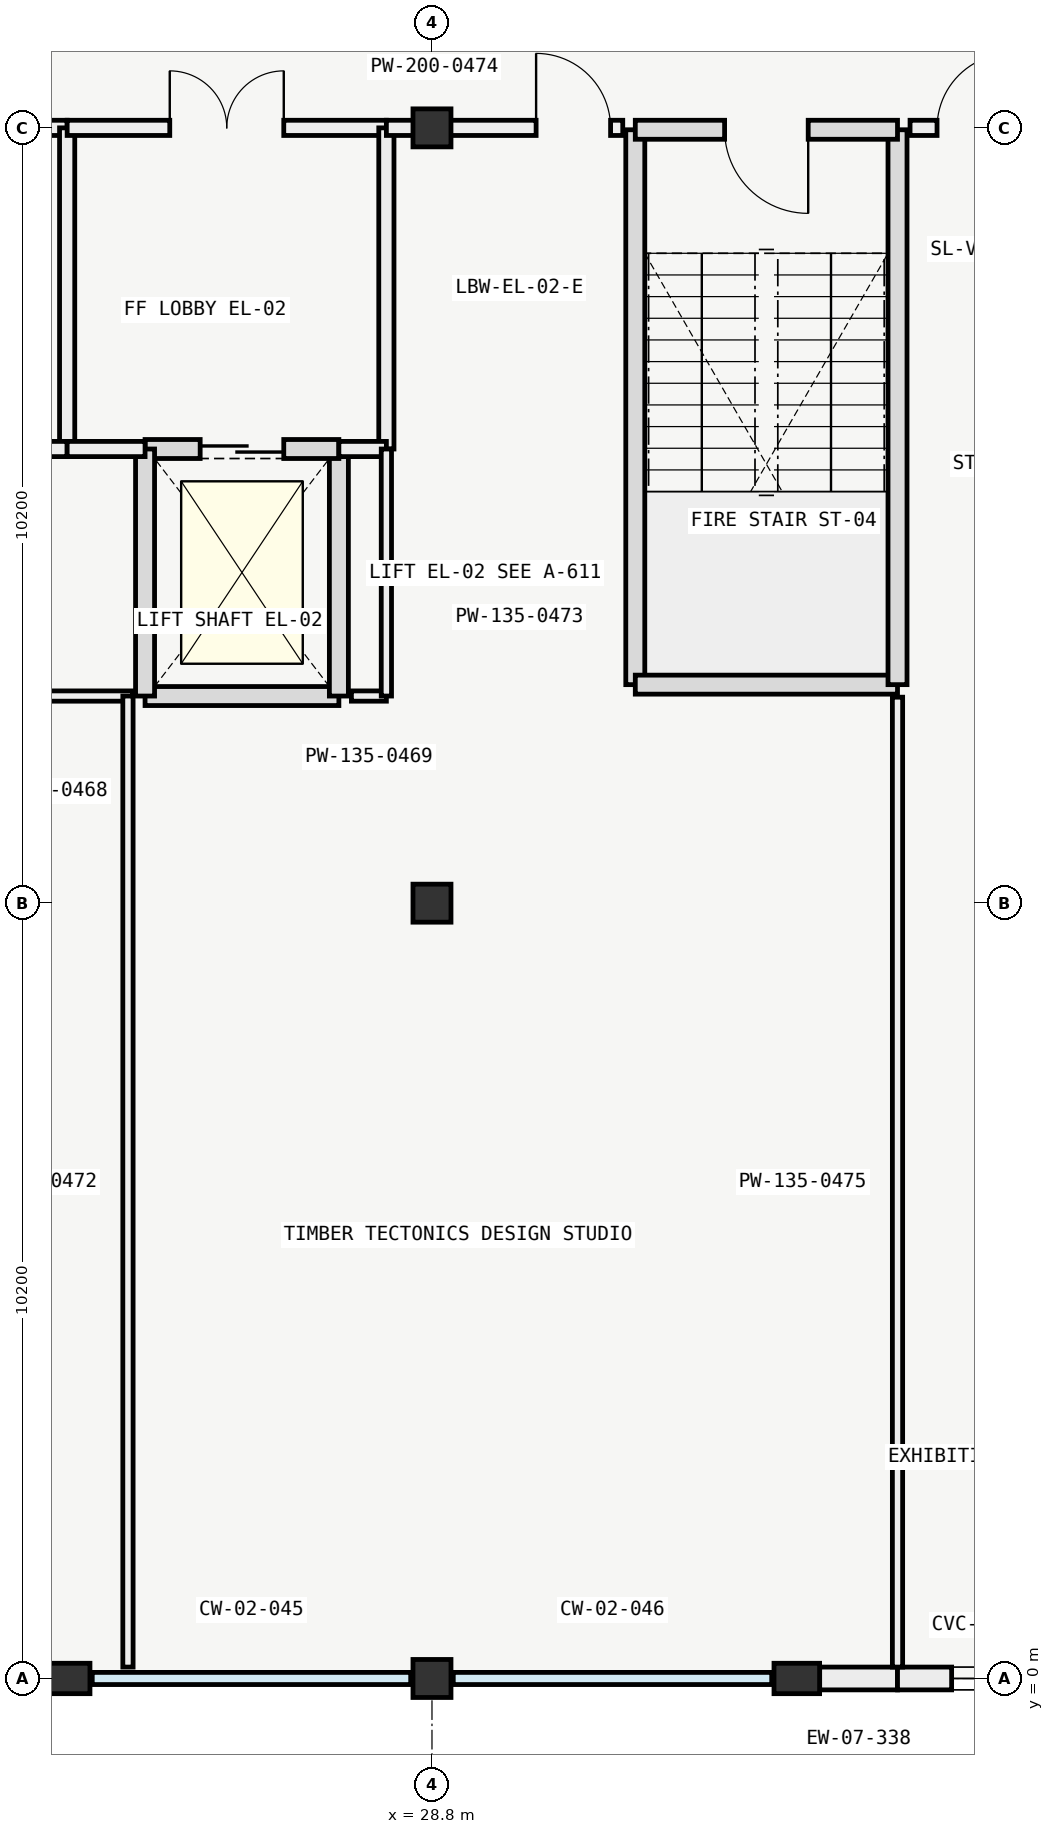
"""IFC4 building model, lengths in metres.
Left out: names, types, materials, properties, quantities, classifications, styles, units other than length and angle.
Written with IfcOpenShell. Run it as: python <this file> out.ifc"""

import sys

from ifc_helpers import new_model, si_unit, direction, frame, frame_2d, origin, origin_2d, place, context, subcontext, project, spatial, rectangle, extrude, element, fill, save


model = new_model("IFC4")
c1 = context("Model", 3, precision=1e-05, world=origin(), true_north=direction((0.0, 1.0)))
c2 = subcontext(c1, "Body", "Model", "MODEL_VIEW")
j1 = project(units=[si_unit("LENGTHUNIT", "METRE"), si_unit("PLANEANGLEUNIT", "RADIAN")], contexts=[c1])
p1 = place(None, origin())
s1 = spatial("IfcSite", under=j1, at=p1, CompositionType="ELEMENT")
p2 = place(p1, origin())
s2 = spatial("IfcBuilding", under=s1, at=p2, CompositionType="ELEMENT")
p3 = place(p2, frame((0.0, 0.0, 26.4)))
s3 = spatial("IfcBuildingStorey", under=s2, at=p3, CompositionType="ELEMENT", Elevation=26.4)
for number, where, z_axis, x_axis in (
    (1, (28.8, 0.0, 0.0), (0.0, 0.0, 1.0), (1.0, 0.0, 0.0)),
    (2, (28.8, 10.2, 0.0), (0.0, 0.0, 1.0), (1.0, 0.0, 0.0)),
    (3, (28.8, 20.4, 0.0), (0.0, 0.0, 1.0), (1.0, 0.0, 0.0)),
):
    element("IfcColumn", number, at=place(p3, frame(where, z_axis=z_axis, x_axis=x_axis)), inside=s3, PredefinedType="COLUMN", context=c2, shape_type="SweptSolid", body=[
        extrude(rectangle(XDim=0.5, YDim=0.5, at=origin_2d()), origin(), (0.0, 0.0, 1.0), 4.2),
    ])
for number, where, z_axis, x_axis in (
    (4, (24.0, 0.0, 0.0), (0.0, 0.0, 1.0), (0.0, 1.0, 0.0)),
    (5, (33.6, 0.0, 0.0), (0.0, 0.0, 1.0), (0.0, 1.0, 0.0)),
):
    element("IfcColumn", number, at=place(p3, frame(where, z_axis=z_axis, x_axis=x_axis)), inside=s3, PredefinedType="PILASTER", context=c2, shape_type="SweptSolid", body=[
        extrude(rectangle(XDim=0.4, YDim=0.6, at=origin_2d()), origin(), (0.0, 0.0, 1.0), 4.2),
    ])
p4 = place(p3, frame((34.925, 0.0, 0.0), z_axis=(0.0, 0.0, 1.0), x_axis=(-1.0, 0.0, 0.0)))
e6 = element("IfcWall", 6, at=p4, inside=s3, PredefinedType="SOLIDWALL", context=c2, shape_type="SweptSolid", body=[
    extrude(rectangle(XDim=1.024, YDim=0.3, at=frame_2d((0.512, 0.0))), origin(), (0.0, 0.0, 1.0), 3.25),
])
p5 = place(p3, frame((38.149, 0.0, 0.0), z_axis=(0.0, 0.0, 1.0), x_axis=(-1.0, 0.0, 0.0)))
e7 = element("IfcWall", 7, at=p5, inside=s3, PredefinedType="SOLIDWALL", context=c2, shape_type="SweptSolid", body=[
    extrude(rectangle(XDim=3.224, YDim=0.3, at=frame_2d((1.612, 0.0))), origin(), (0.0, 0.0, 1.0), 3.25),
])
p6 = place(p5, frame((0.712, 0.0, 0.8)))
e8 = element("IfcOpeningElement", 8, at=p6, cuts=e7, PredefinedType="OPENING", context=c2, shape_type="SweptSolid", body=[
    extrude(rectangle(XDim=1.8, YDim=2.1, at=frame_2d((0.9, 1.05))), frame((0.0, 0.16, 0.0), z_axis=(0.0, -1.0, 0.0), x_axis=(1.0, 0.0, 0.0)), (0.0, 0.0, 1.0), 0.32),
])
p7 = place(p3, frame((31.475, 20.375, 0.0), z_axis=(0.0, 0.0, 1.0), x_axis=(0.0, -1.0, 0.0)))
e9 = element("IfcWall", 9, at=p7, inside=s3, PredefinedType="SOLIDWALL", context=c2, shape_type="SweptSolid", body=[
    extrude(rectangle(XDim=7.3, YDim=0.25, at=frame_2d((3.65, 0.0))), origin(), (0.0, 0.0, 1.0), 3.975),
])
p8 = place(p3, frame((31.475, 13.075, 0.0), z_axis=(0.0, 0.0, 1.0), x_axis=(1.0, 0.0, 0.0)))
e10 = element("IfcWall", 10, at=p8, inside=s3, PredefinedType="SOLIDWALL", context=c2, shape_type="SweptSolid", body=[
    extrude(rectangle(XDim=3.45, YDim=0.25, at=frame_2d((1.725, 0.0))), origin(), (0.0, 0.0, 1.0), 3.975),
])
p9 = place(p3, frame((34.925, 13.075, 0.0), z_axis=(0.0, 0.0, 1.0), x_axis=(0.0, 1.0, 0.0)))
e11 = element("IfcWall", 11, at=p9, inside=s3, PredefinedType="SOLIDWALL", context=c2, shape_type="SweptSolid", body=[
    extrude(rectangle(XDim=7.3, YDim=0.25, at=frame_2d((3.65, 0.0))), origin(), (0.0, 0.0, 1.0), 3.975),
])
p10 = place(p3, frame((34.925, 20.375, 0.0), z_axis=(0.0, 0.0, 1.0), x_axis=(-1.0, 0.0, 0.0)))
e12 = element("IfcWall", 12, at=p10, inside=s3, PredefinedType="SOLIDWALL", context=c2, shape_type="SweptSolid", body=[
    extrude(rectangle(XDim=3.45, YDim=0.25, at=frame_2d((1.725, 0.0))), origin(), (0.0, 0.0, 1.0), 3.975),
])
p11 = place(p10, frame((1.175, 0.0, 0.0)))
e13 = element("IfcOpeningElement", 13, at=p11, cuts=e12, PredefinedType="OPENING", context=c2, shape_type="SweptSolid", body=[
    extrude(rectangle(XDim=1.1, YDim=2.2, at=frame_2d((0.55, 1.1))), frame((0.0, 0.135, 0.0), z_axis=(0.0, -1.0, 0.0), x_axis=(1.0, 0.0, 0.0)), (0.0, 0.0, 1.0), 0.27),
])
p12 = place(p3, frame((19.8, 20.4, 0.0), z_axis=(0.0, 0.0, 1.0), x_axis=(1.0, 0.0, 0.0)))
e14 = element("IfcWall", 14, at=p12, inside=s3, PredefinedType="PARTITIONING", context=c2, shape_type="SweptSolid", body=[
    extrude(rectangle(XDim=4.2, YDim=0.2, at=frame_2d((2.1, 0.0))), origin(), (0.0, 0.0, 1.0), 3.405),
])
p13 = place(p12, frame((1.35, 0.0, 0.0)))
e15 = element("IfcOpeningElement", 15, at=p13, cuts=e14, PredefinedType="OPENING", context=c2, shape_type="SweptSolid", body=[
    extrude(rectangle(XDim=1.5, YDim=2.2, at=frame_2d((0.75, 1.1))), frame((0.0, 0.11, 0.0), z_axis=(0.0, -1.0, 0.0), x_axis=(1.0, 0.0, 0.0)), (0.0, 0.0, 1.0), 0.22),
])
p14 = place(p3, frame((24.0, 16.175, 0.0), z_axis=(0.0, 0.0, 1.0), x_axis=(0.0, 1.0, 0.0)))
e16 = element("IfcWall", 16, at=p14, inside=s3, PredefinedType="PARTITIONING", context=c2, shape_type="SweptSolid", body=[
    extrude(rectangle(XDim=4.225, YDim=0.2, at=frame_2d((2.112, 0.0))), origin(), (0.0, 0.0, 1.0), 3.405),
])
p15 = place(p3, frame((22.975, 16.175, 0.0), z_axis=(0.0, 0.0, 1.0), x_axis=(1.0, 0.0, 0.0)))
e17 = element("IfcWall", 17, at=p15, inside=s3, PredefinedType="PARTITIONING", context=c2, shape_type="SweptSolid", body=[
    extrude(rectangle(XDim=1.025, YDim=0.2, at=frame_2d((0.512, 0.0))), origin(), (0.0, 0.0, 1.0), 3.55),
])
p16 = place(p3, frame((25.025, 12.925, 0.0), z_axis=(0.0, 0.0, 1.0), x_axis=(1.0, 0.0, 0.0)))
e18 = element("IfcWall", 18, at=p16, inside=s3, PredefinedType="SOLIDWALL", context=c2, shape_type="SweptSolid", body=[
    extrude(rectangle(XDim=2.55, YDim=0.25, at=frame_2d((1.275, 0.0))), origin(), (0.0, 0.0, 1.0), 3.975),
])
p17 = place(p3, frame((27.575, 12.925, 0.0), z_axis=(0.0, 0.0, 1.0), x_axis=(0.0, 1.0, 0.0)))
e19 = element("IfcWall", 19, at=p17, inside=s3, PredefinedType="SOLIDWALL", context=c2, shape_type="SweptSolid", body=[
    extrude(rectangle(XDim=3.25, YDim=0.25, at=frame_2d((1.625, 0.0))), origin(), (0.0, 0.0, 1.0), 3.975),
])
p18 = place(p3, frame((27.575, 16.175, 0.0), z_axis=(0.0, 0.0, 1.0), x_axis=(-1.0, 0.0, 0.0)))
e20 = element("IfcWall", 20, at=p18, inside=s3, PredefinedType="SOLIDWALL", context=c2, shape_type="SweptSolid", body=[
    extrude(rectangle(XDim=2.55, YDim=0.25, at=frame_2d((1.275, 0.0))), origin(), (0.0, 0.0, 1.0), 3.975),
])
p19 = place(p18, frame((0.725, 0.0, 0.0)))
e21 = element("IfcOpeningElement", 21, at=p19, cuts=e20, PredefinedType="OPENING", context=c2, shape_type="SweptSolid", body=[
    extrude(rectangle(XDim=1.1, YDim=2.1, at=frame_2d((0.55, 1.05))), frame((0.0, 0.135, 0.0), z_axis=(0.0, -1.0, 0.0), x_axis=(1.0, 0.0, 0.0)), (0.0, 0.0, 1.0), 0.27),
])
p20 = place(p3, frame((25.025, 16.175, 0.0), z_axis=(0.0, 0.0, 1.0), x_axis=(0.0, -1.0, 0.0)))
e22 = element("IfcWall", 22, at=p20, inside=s3, PredefinedType="SOLIDWALL", context=c2, shape_type="SweptSolid", body=[
    extrude(rectangle(XDim=3.25, YDim=0.25, at=frame_2d((1.625, 0.0))), origin(), (0.0, 0.0, 1.0), 3.975),
])
p21 = place(p3, frame((24.0, 20.4, 0.0), z_axis=(0.0, 0.0, 1.0), x_axis=(1.0, 0.0, 0.0)))
e23 = element("IfcWall", 23, at=p21, inside=s3, PredefinedType="PARTITIONING", context=c2, shape_type="SweptSolid", body=[
    extrude(rectangle(XDim=4.2, YDim=0.2, at=frame_2d((2.1, 0.0))), origin(), (0.0, 0.0, 1.0), 3.405),
])
p22 = place(p21, frame((1.35, 0.0, 0.0)))
e24 = element("IfcOpeningElement", 24, at=p22, cuts=e23, PredefinedType="OPENING", context=c2, shape_type="SweptSolid", body=[
    extrude(rectangle(XDim=1.5, YDim=2.2, at=frame_2d((0.75, 1.1))), frame((0.0, 0.11, 0.0), z_axis=(0.0, -1.0, 0.0), x_axis=(1.0, 0.0, 0.0)), (0.0, 0.0, 1.0), 0.22),
])
p23 = place(p3, frame((28.2, 16.175, 0.0), z_axis=(0.0, 0.0, 1.0), x_axis=(0.0, 1.0, 0.0)))
e25 = element("IfcWall", 25, at=p23, inside=s3, PredefinedType="PARTITIONING", context=c2, shape_type="SweptSolid", body=[
    extrude(rectangle(XDim=4.225, YDim=0.2, at=frame_2d((2.112, 0.0))), origin(), (0.0, 0.0, 1.0), 3.405),
])
p24 = place(p3, frame((24.0, 16.175, 0.0), z_axis=(0.0, 0.0, 1.0), x_axis=(1.0, 0.0, 0.0)))
e26 = element("IfcWall", 26, at=p24, inside=s3, PredefinedType="PARTITIONING", context=c2, shape_type="SweptSolid", body=[
    extrude(rectangle(XDim=1.025, YDim=0.2, at=frame_2d((0.512, 0.0))), origin(), (0.0, 0.0, 1.0), 3.55),
])
p25 = place(p3, frame((27.575, 16.175, 0.0), z_axis=(0.0, 0.0, 1.0), x_axis=(1.0, 0.0, 0.0)))
e27 = element("IfcWall", 27, at=p25, inside=s3, PredefinedType="PARTITIONING", context=c2, shape_type="SweptSolid", body=[
    extrude(rectangle(XDim=0.625, YDim=0.2, at=frame_2d((0.312, 0.0))), origin(), (0.0, 0.0, 1.0), 3.55),
])
p26 = place(p3, frame((23.14, 12.925, 0.0), z_axis=(0.0, 0.0, 1.0), x_axis=(1.0, 0.0, 0.0)))
e28 = element("IfcWall", 28, at=p26, inside=s3, PredefinedType="PARTITIONING", context=c2, shape_type="SweptSolid", body=[
    extrude(rectangle(XDim=1.72, YDim=0.135, at=frame_2d((0.86, 0.0))), origin(), (0.0, 0.0, 1.0), 3.85),
])
p27 = place(p3, frame((27.74, 12.925, 0.0), z_axis=(0.0, 0.0, 1.0), x_axis=(1.0, 0.0, 0.0)))
e29 = element("IfcWall", 29, at=p27, inside=s3, PredefinedType="PARTITIONING", context=c2, shape_type="SweptSolid", body=[
    extrude(rectangle(XDim=0.46, YDim=0.135, at=frame_2d((0.23, 0.0))), origin(), (0.0, 0.0, 1.0), 3.85),
])
p28 = place(p3, frame((24.8, 0.15, 0.0), z_axis=(0.0, 0.0, 1.0), x_axis=(0.0, 1.0, 0.0)))
e30 = element("IfcWall", 30, at=p28, inside=s3, PredefinedType="PARTITIONING", context=c2, shape_type="SweptSolid", body=[
    extrude(rectangle(XDim=12.775, YDim=0.135, at=frame_2d((6.388, 0.0))), origin(), (0.0, 0.0, 1.0), 3.405),
])
p29 = place(p3, frame((28.2, 12.925, 0.0), z_axis=(0.0, 0.0, 1.0), x_axis=(0.0, 1.0, 0.0)))
e31 = element("IfcWall", 31, at=p29, inside=s3, PredefinedType="PARTITIONING", context=c2, shape_type="SweptSolid", body=[
    extrude(rectangle(XDim=3.25, YDim=0.135, at=frame_2d((1.625, 0.0))), origin(), (0.0, 0.0, 1.0), 3.85),
])
p30 = place(p3, frame((28.2, 20.4, 0.0), z_axis=(0.0, 0.0, 1.0), x_axis=(1.0, 0.0, 0.0)))
e32 = element("IfcWall", 32, at=p30, inside=s3, PredefinedType="PARTITIONING", context=c2, shape_type="SweptSolid", body=[
    extrude(rectangle(XDim=3.11, YDim=0.2, at=frame_2d((1.555, 0.0))), origin(), (0.0, 0.0, 1.0), 3.305),
])
p31 = place(p30, frame((1.97, 0.0, 0.0)))
e33 = element("IfcOpeningElement", 33, at=p31, cuts=e32, PredefinedType="OPENING", context=c2, shape_type="SweptSolid", body=[
    extrude(rectangle(XDim=0.98, YDim=2.15, at=frame_2d((0.49, 1.075))), frame((0.0, 0.11, 0.0), z_axis=(0.0, -1.0, 0.0), x_axis=(1.0, 0.0, 0.0)), (0.0, 0.0, 1.0), 0.22),
])
p32 = place(p3, frame((34.925, 0.15, 0.0), z_axis=(0.0, 0.0, 1.0), x_axis=(0.0, 1.0, 0.0)))
e34 = element("IfcWall", 34, at=p32, inside=s3, PredefinedType="PARTITIONING", context=c2, shape_type="SweptSolid", body=[
    extrude(rectangle(XDim=12.76, YDim=0.135, at=frame_2d((6.38, 0.0))), origin(), (0.0, 0.0, 1.0), 3.405),
])
p33 = place(p3, frame((35.09, 20.4, 0.0), z_axis=(0.0, 0.0, 1.0), x_axis=(1.0, 0.0, 0.0)))
e35 = element("IfcWall", 35, at=p33, inside=s3, PredefinedType="PARTITIONING", context=c2, shape_type="SweptSolid", body=[
    extrude(rectangle(XDim=9.56, YDim=0.2, at=frame_2d((4.78, 0.0))), origin(), (0.0, 0.0, 1.0), 2.355),
])
p34 = place(p33, frame((0.355, 0.0, 0.0)))
e36 = element("IfcOpeningElement", 36, at=p34, cuts=e35, PredefinedType="OPENING", context=c2, shape_type="SweptSolid", body=[
    extrude(rectangle(XDim=0.98, YDim=2.15, at=frame_2d((0.49, 1.075))), frame((0.0, 0.11, 0.0), z_axis=(0.0, -1.0, 0.0), x_axis=(1.0, 0.0, 0.0)), (0.0, 0.0, 1.0), 0.22),
])
p35 = place(p33, frame((7.56, 0.0, 0.0)))
e37 = element("IfcOpeningElement", 37, at=p35, cuts=e35, PredefinedType="OPENING", context=c2, shape_type="SweptSolid", body=[
    extrude(rectangle(XDim=0.98, YDim=2.15, at=frame_2d((0.49, 1.075))), frame((0.0, 0.11, 0.0), z_axis=(0.0, -1.0, 0.0), x_axis=(1.0, 0.0, 0.0)), (0.0, 0.0, 1.0), 0.22),
])
p36 = place(p6, origin())
e38 = element("IfcWindow", 38, at=p36, inside=s3, PartitioningType="SINGLE_PANEL", PredefinedType="WINDOW", context=c2, shape_type="SweptSolid", body=[
    extrude(rectangle(XDim=1.8, YDim=2.1, at=frame_2d((0.9, 1.05))), frame((0.0, 0.03, 0.0), z_axis=(0.0, -1.0, 0.0), x_axis=(1.0, 0.0, 0.0)), (0.0, 0.0, 1.0), 0.06),
])
fill(e8, e38)
p37 = place(p11, origin())
e39 = element("IfcDoor", 39, at=p37, inside=s3, OperationType="SINGLE_SWING_LEFT", PredefinedType="DOOR", context=c2, shape_type="SweptSolid", body=[
    extrude(rectangle(XDim=1.1, YDim=2.2, at=frame_2d((0.55, 1.1))), frame((0.0, 0.025, 0.0), z_axis=(0.0, -1.0, 0.0), x_axis=(1.0, 0.0, 0.0)), (0.0, 0.0, 1.0), 0.05),
])
fill(e13, e39)
p38 = place(p19, origin())
e40 = element("IfcDoor", 40, at=p38, inside=s3, OperationType="SLIDING_TO_LEFT", PredefinedType="DOOR", context=c2, shape_type="SweptSolid", body=[
    extrude(rectangle(XDim=1.1, YDim=2.1, at=frame_2d((0.55, 1.05))), frame((0.0, 0.025, 0.0), z_axis=(0.0, -1.0, 0.0), x_axis=(1.0, 0.0, 0.0)), (0.0, 0.0, 1.0), 0.05),
])
fill(e21, e40)
p39 = place(p22, origin())
e41 = element("IfcDoor", 41, at=p39, inside=s3, OperationType="SINGLE_SWING_LEFT", PredefinedType="DOOR", context=c2, shape_type="SweptSolid", body=[
    extrude(rectangle(XDim=1.5, YDim=2.2, at=frame_2d((0.75, 1.1))), frame((0.0, 0.025, 0.0), z_axis=(0.0, -1.0, 0.0), x_axis=(1.0, 0.0, 0.0)), (0.0, 0.0, 1.0), 0.05),
])
fill(e24, e41)
p40 = place(p31, origin())
e42 = element("IfcDoor", 42, at=p40, inside=s3, OperationType="SINGLE_SWING_LEFT", PredefinedType="DOOR", context=c2, shape_type="SweptSolid", body=[
    extrude(rectangle(XDim=0.98, YDim=2.15, at=frame_2d((0.49, 1.075))), frame((0.0, 0.025, 0.0), z_axis=(0.0, -1.0, 0.0), x_axis=(1.0, 0.0, 0.0)), (0.0, 0.0, 1.0), 0.05),
])
fill(e33, e42)
p41 = place(p34, origin())
e43 = element("IfcDoor", 43, at=p41, inside=s3, OperationType="SINGLE_SWING_RIGHT", PredefinedType="DOOR", context=c2, shape_type="SweptSolid", body=[
    extrude(rectangle(XDim=0.98, YDim=2.15, at=frame_2d((0.49, 1.075))), frame((0.0, 0.025, 0.0), z_axis=(0.0, -1.0, 0.0), x_axis=(1.0, 0.0, 0.0)), (0.0, 0.0, 1.0), 0.05),
])
fill(e36, e43)
save(model, sys.argv[1])
